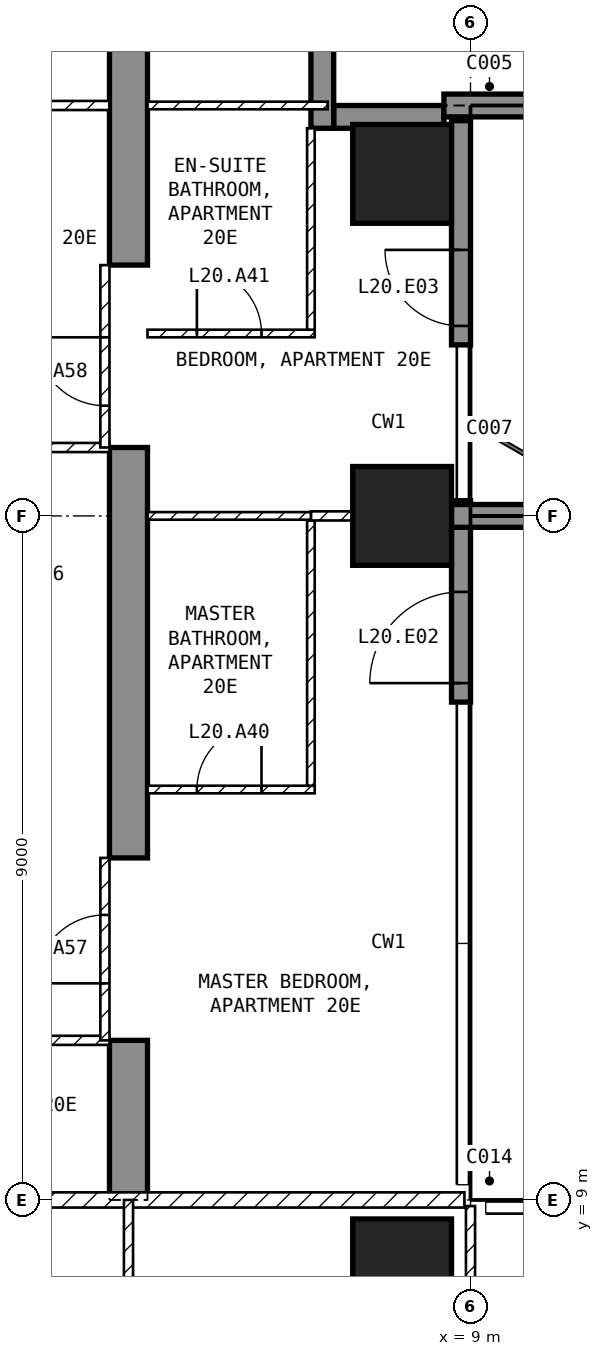
"""IFC4 building model, lengths in metres.
Left out: names, types, materials, properties, quantities, classifications, styles, units other than length and angle.
Written with IfcOpenShell. Run it as: python <this file> out.ifc"""

import sys

from ifc_helpers import new_model, si_unit, direction, frame, frame_2d, origin, origin_2d, place, context, subcontext, project, spatial, polyline, rectangle, outline, extrude, element, fill, save


model = new_model("IFC4")
c1 = context("Model", 3, precision=1e-05, world=origin(), true_north=direction((0.0, 1.0)))
c2 = subcontext(c1, "Body", "Model", "MODEL_VIEW")
j1 = project(units=[si_unit("LENGTHUNIT", "METRE"), si_unit("PLANEANGLEUNIT", "RADIAN")], contexts=[c1])
p1 = place(None, origin())
s1 = spatial("IfcSite", under=j1, at=p1, CompositionType="ELEMENT")
p2 = place(p1, origin())
s2 = spatial("IfcBuilding", under=s1, at=p2, CompositionType="ELEMENT")
p3 = place(p2, frame((0.0, 0.0, 89.0)))
s3 = spatial("IfcBuildingStorey", under=s2, at=p3, CompositionType="ELEMENT", Elevation=89.0)
for number, where, z_axis, x_axis in (
    (1, (8.1, 8.1, -0.25), (0.0, 0.0, 1.0), (1.0, 0.0, 0.0)),
    (2, (8.1, 18.0, -0.25), (0.0, 0.0, 1.0), (1.0, 0.0, 0.0)),
    (3, (8.1, 22.5, -0.25), (0.0, 0.0, 1.0), (1.0, 0.0, 0.0)),
):
    element("IfcColumn", number, at=place(p3, frame(where, z_axis=z_axis, x_axis=x_axis)), inside=s3, PredefinedType="COLUMN", context=c2, shape_type="SweptSolid", body=[
        extrude(rectangle(XDim=1.3, YDim=1.3, at=origin_2d()), origin(), (0.0, 0.0, 1.0), 3.45),
    ])
p4 = place(p3, frame((4.25, 9.0, -0.25), z_axis=(1.0, 0.0, 0.0), x_axis=(0.0, 1.0, 0.0)))
e4 = element("IfcWall", 4, at=p4, inside=s3, PredefinedType="SHEAR", context=c2, shape_type="SweptSolid", body=[
    extrude(outline(polyline([(0.0, 0.0), (2.1, 0.0), (2.1, 2.65), (4.5, 2.65), (4.5, 0.0), (9.9, 0.0), (9.9, 2.65), (12.3, 2.65), (12.3, 0.0), (16.45, 0.0), (16.45, 3.45), (0.0, 3.45), (0.0, 0.0)])), origin(), (0.0, 0.0, 1.0), 0.5),
])
p5 = place(p3, frame((8.875, 15.55, 0.0), z_axis=(0.0, 0.0, 1.0), x_axis=(0.0, 1.0, 0.0)))
e5 = element("IfcWall", 5, at=p5, inside=s3, PredefinedType="SOLIDWALL", context=c2, shape_type="SweptSolid", body=[
    extrude(rectangle(XDim=2.65, YDim=0.25, at=frame_2d((1.325, 0.0))), origin(), (0.0, 0.0, 1.0), 3.2),
])
p6 = place(p5, frame((0.25, 0.0, 0.0)))
e6 = element("IfcOpeningElement", 6, at=p6, cuts=e5, PredefinedType="OPENING", context=c2, shape_type="SweptSolid", body=[
    extrude(rectangle(XDim=1.2, YDim=2.4, at=frame_2d((0.6, 1.2))), frame((0.0, 0.135, 0.0), z_axis=(0.0, -1.0, 0.0), x_axis=(1.0, 0.0, 0.0)), (0.0, 0.0, 1.0), 0.27),
])
p7 = place(p3, frame((8.875, 20.25, 0.0), z_axis=(0.0, 0.0, 1.0), x_axis=(0.0, 1.0, 0.0)))
e7 = element("IfcWall", 7, at=p7, inside=s3, PredefinedType="SOLIDWALL", context=c2, shape_type="SweptSolid", body=[
    extrude(rectangle(XDim=2.95, YDim=0.25, at=frame_2d((1.475, 0.0))), origin(), (0.0, 0.0, 1.0), 3.2),
])
p8 = place(p7, frame((0.25, 0.0, 0.0)))
e8 = element("IfcOpeningElement", 8, at=p8, cuts=e7, PredefinedType="OPENING", context=c2, shape_type="SweptSolid", body=[
    extrude(rectangle(XDim=1.0, YDim=2.4, at=frame_2d((0.5, 1.2))), frame((0.0, 0.135, 0.0), z_axis=(0.0, -1.0, 0.0), x_axis=(1.0, 0.0, 0.0)), (0.0, 0.0, 1.0), 0.27),
])
p9 = place(p3, frame((8.65, 23.25, 0.0), z_axis=(0.0, 0.0, 1.0), x_axis=(-1.0, 0.0, 0.0)))
e9 = element("IfcWall", 9, at=p9, inside=s3, PredefinedType="SOLIDWALL", context=c2, shape_type="SweptSolid", body=[
    extrude(rectangle(XDim=1.45, YDim=0.3, at=frame_2d((0.725, 0.0))), origin(), (0.0, 0.0, 1.0), 3.2),
])
p10 = place(p3, frame((7.05, 23.1, 0.0), z_axis=(0.0, 0.0, 1.0), x_axis=(0.0, 1.0, 0.0)))
e10 = element("IfcWall", 10, at=p10, inside=s3, PredefinedType="SOLIDWALL", context=c2, shape_type="SweptSolid", body=[
    extrude(rectangle(XDim=1.8, YDim=0.3, at=frame_2d((0.9, 0.0))), origin(), (0.0, 0.0, 1.0), 3.2),
])
p11 = place(p3, frame((8.75, 18.0, 0.0), z_axis=(0.0, 0.0, 1.0), x_axis=(1.0, 0.0, 0.0)))
e11 = element("IfcWall", 11, at=p11, inside=s3, PredefinedType="SOLIDWALL", context=c2, shape_type="SweptSolid", body=[
    extrude(rectangle(XDim=2.95, YDim=0.3, at=frame_2d((1.475, 0.0))), origin(), (0.0, 0.0, 1.0), 3.2),
])
p12 = place(p3, frame((8.65, 23.4, 0.0), z_axis=(0.0, 0.0, 1.0), x_axis=(1.0, 0.0, 0.0)))
e12 = element("IfcWall", 12, at=p12, inside=s3, PredefinedType="SOLIDWALL", context=c2, shape_type="SweptSolid", body=[
    extrude(rectangle(XDim=3.05, YDim=0.3, at=frame_2d((1.525, 0.0))), origin(), (0.0, 0.0, 1.0), 3.2),
])
p13 = place(p3, frame((-8.92, 9.0, 0.0), z_axis=(0.0, 0.0, 1.0), x_axis=(1.0, 0.0, 0.0)))
e13 = element("IfcWall", 13, at=p13, inside=s3, PredefinedType="PARTITIONING", context=c2, shape_type="SweptSolid", body=[
    extrude(rectangle(XDim=17.84, YDim=0.2, at=frame_2d((8.92, 0.0))), origin(), (0.0, 0.0, 1.0), 3.2),
])
p14 = place(p13, frame((8.42, 0.0, 0.0)))
e14 = element("IfcOpeningElement", 14, at=p14, cuts=e13, PredefinedType="OPENING", context=c2, shape_type="SweptSolid", body=[
    extrude(rectangle(XDim=1.0, YDim=2.1, at=frame_2d((0.5, 1.05))), frame((0.0, 0.11, 0.0), z_axis=(0.0, -1.0, 0.0), x_axis=(1.0, 0.0, 0.0)), (0.0, 0.0, 1.0), 0.22),
])
p15 = place(p3, frame((9.0, 5.1, 0.0), z_axis=(0.0, 0.0, 1.0), x_axis=(0.0, 1.0, 0.0)))
e15 = element("IfcWall", 15, at=p15, inside=s3, PredefinedType="PARTITIONING", context=c2, shape_type="SweptSolid", body=[
    extrude(rectangle(XDim=3.82, YDim=0.12, at=frame_2d((1.91, 0.0))), origin(), (0.0, 0.0, 1.0), 3.2),
])
p16 = place(p15, frame((0.25, 0.0, 0.0)))
e16 = element("IfcOpeningElement", 16, at=p16, cuts=e15, PredefinedType="OPENING", context=c2, shape_type="SweptSolid", body=[
    extrude(rectangle(XDim=0.9, YDim=2.1, at=frame_2d((0.45, 1.05))), frame((0.0, 0.07, 0.0), z_axis=(0.0, -1.0, 0.0), x_axis=(1.0, 0.0, 0.0)), (0.0, 0.0, 1.0), 0.14),
])
p17 = place(p3, frame((4.5, 1.3, 0.0), z_axis=(0.0, 0.0, 1.0), x_axis=(0.0, 1.0, 0.0)))
e17 = element("IfcWall", 17, at=p17, inside=s3, PredefinedType="PARTITIONING", context=c2, shape_type="SweptSolid", body=[
    extrude(rectangle(XDim=7.7, YDim=0.12, at=frame_2d((3.85, 0.0))), origin(), (0.0, 0.0, 1.0), 3.2),
])
p18 = place(p17, frame((4.988, 0.0, 0.0)))
e18 = element("IfcOpeningElement", 18, at=p18, cuts=e17, PredefinedType="OPENING", context=c2, shape_type="SweptSolid", body=[
    extrude(rectangle(XDim=0.9, YDim=2.1, at=frame_2d((0.45, 1.05))), frame((0.0, 0.07, 0.0), z_axis=(0.0, -1.0, 0.0), x_axis=(1.0, 0.0, 0.0)), (0.0, 0.0, 1.0), 0.14),
])
p19 = place(p3, frame((-2.1, 11.1, 0.0), z_axis=(0.0, 0.0, 1.0), x_axis=(1.0, 0.0, 0.0)))
e19 = element("IfcWall", 19, at=p19, inside=s3, PredefinedType="PARTITIONING", context=c2, shape_type="SweptSolid", body=[
    extrude(rectangle(XDim=6.35, YDim=0.12, at=frame_2d((3.175, 0.0))), origin(), (0.0, 0.0, 1.0), 3.2),
])
p20 = place(p19, frame((2.725, 0.0, 0.0)))
e20 = element("IfcOpeningElement", 20, at=p20, cuts=e19, PredefinedType="OPENING", context=c2, shape_type="SweptSolid", body=[
    extrude(rectangle(XDim=0.9, YDim=2.1, at=frame_2d((0.45, 1.05))), frame((0.0, 0.07, 0.0), z_axis=(0.0, -1.0, 0.0), x_axis=(1.0, 0.0, 0.0)), (0.0, 0.0, 1.0), 0.14),
])
p21 = place(p3, frame((-4.25, 18.9, 0.0), z_axis=(0.0, 0.0, 1.0), x_axis=(1.0, 0.0, 0.0)))
e21 = element("IfcWall", 21, at=p21, inside=s3, PredefinedType="PARTITIONING", context=c2, shape_type="SweptSolid", body=[
    extrude(rectangle(XDim=8.5, YDim=0.12, at=frame_2d((4.25, 0.0))), origin(), (0.0, 0.0, 1.0), 3.2),
])
p22 = place(p21, frame((1.925, 0.0, 0.0)))
e22 = element("IfcOpeningElement", 22, at=p22, cuts=e21, PredefinedType="OPENING", context=c2, shape_type="SweptSolid", body=[
    extrude(rectangle(XDim=0.9, YDim=2.1, at=frame_2d((0.45, 1.05))), frame((0.0, 0.07, 0.0), z_axis=(0.0, -1.0, 0.0), x_axis=(1.0, 0.0, 0.0)), (0.0, 0.0, 1.0), 0.14),
])
p23 = place(p3, frame((-4.25, 23.4, 0.0), z_axis=(0.0, 0.0, 1.0), x_axis=(1.0, 0.0, 0.0)))
e23 = element("IfcWall", 23, at=p23, inside=s3, PredefinedType="PARTITIONING", context=c2, shape_type="SweptSolid", body=[
    extrude(rectangle(XDim=8.5, YDim=0.12, at=frame_2d((4.25, 0.0))), origin(), (0.0, 0.0, 1.0), 3.2),
])
p24 = place(p23, frame((1.925, 0.0, 0.0)))
e24 = element("IfcOpeningElement", 24, at=p24, cuts=e23, PredefinedType="OPENING", context=c2, shape_type="SweptSolid", body=[
    extrude(rectangle(XDim=0.9, YDim=2.1, at=frame_2d((0.45, 1.05))), frame((0.0, 0.07, 0.0), z_axis=(0.0, -1.0, 0.0), x_axis=(1.0, 0.0, 0.0)), (0.0, 0.0, 1.0), 0.14),
])
p25 = place(p3, frame((4.75, 14.4, 0.0), z_axis=(0.0, 0.0, 1.0), x_axis=(1.0, 0.0, 0.0)))
e25 = element("IfcWall", 25, at=p25, inside=s3, PredefinedType="PARTITIONING", context=c2, shape_type="SweptSolid", body=[
    extrude(rectangle(XDim=2.2, YDim=0.1, at=frame_2d((1.1, 0.0))), origin(), (0.0, 0.0, 1.0), 3.2),
])
p26 = place(p25, frame((0.65, 0.0, 0.0)))
e26 = element("IfcOpeningElement", 26, at=p26, cuts=e25, PredefinedType="OPENING", context=c2, shape_type="SweptSolid", body=[
    extrude(rectangle(XDim=0.85, YDim=2.1, at=frame_2d((0.425, 1.05))), frame((0.0, 0.06, 0.0), z_axis=(0.0, -1.0, 0.0), x_axis=(1.0, 0.0, 0.0)), (0.0, 0.0, 1.0), 0.12),
])
p27 = place(p3, frame((6.9, 14.45, 0.0), z_axis=(0.0, 0.0, 1.0), x_axis=(0.0, 1.0, 0.0)))
e27 = element("IfcWall", 27, at=p27, inside=s3, PredefinedType="PARTITIONING", context=c2, shape_type="SweptSolid", body=[
    extrude(rectangle(XDim=3.49, YDim=0.1, at=frame_2d((1.745, 0.0))), origin(), (0.0, 0.0, 1.0), 3.2),
])
p28 = place(p3, frame((6.9, 18.0, 0.0), z_axis=(0.0, 0.0, 1.0), x_axis=(1.0, 0.0, 0.0)))
e28 = element("IfcWall", 28, at=p28, inside=s3, PredefinedType="PARTITIONING", context=c2, shape_type="SweptSolid", body=[
    extrude(rectangle(XDim=0.55, YDim=0.12, at=frame_2d((0.275, 0.0))), origin(), (0.0, 0.0, 1.0), 2.296),
])
p29 = place(p3, frame((4.75, 18.0, 0.0), z_axis=(0.0, 0.0, 1.0), x_axis=(1.0, 0.0, 0.0)))
e29 = element("IfcWall", 29, at=p29, inside=s3, PredefinedType="PARTITIONING", context=c2, shape_type="SweptSolid", body=[
    extrude(rectangle(XDim=2.15, YDim=0.1, at=frame_2d((1.075, 0.0))), origin(), (0.0, 0.0, 1.0), 2.296),
])
p30 = place(p3, frame((4.75, 20.4, 0.0), z_axis=(0.0, 0.0, 1.0), x_axis=(1.0, 0.0, 0.0)))
e30 = element("IfcWall", 30, at=p30, inside=s3, PredefinedType="PARTITIONING", context=c2, shape_type="SweptSolid", body=[
    extrude(rectangle(XDim=2.2, YDim=0.1, at=frame_2d((1.1, 0.0))), origin(), (0.0, 0.0, 1.0), 3.2),
])
p31 = place(p30, frame((0.65, 0.0, 0.0)))
e31 = element("IfcOpeningElement", 31, at=p31, cuts=e30, PredefinedType="OPENING", context=c2, shape_type="SweptSolid", body=[
    extrude(rectangle(XDim=0.85, YDim=2.1, at=frame_2d((0.425, 1.05))), frame((0.0, 0.06, 0.0), z_axis=(0.0, -1.0, 0.0), x_axis=(1.0, 0.0, 0.0)), (0.0, 0.0, 1.0), 0.12),
])
p32 = place(p3, frame((6.9, 20.45, 0.0), z_axis=(0.0, 0.0, 1.0), x_axis=(0.0, 1.0, 0.0)))
e32 = element("IfcWall", 32, at=p32, inside=s3, PredefinedType="PARTITIONING", context=c2, shape_type="SweptSolid", body=[
    extrude(rectangle(XDim=2.65, YDim=0.1, at=frame_2d((1.325, 0.0))), origin(), (0.0, 0.0, 1.0), 3.2),
])
p33 = place(p3, frame((4.75, 23.4, 0.0), z_axis=(0.0, 0.0, 1.0), x_axis=(1.0, 0.0, 0.0)))
e33 = element("IfcWall", 33, at=p33, inside=s3, PredefinedType="PARTITIONING", context=c2, shape_type="SweptSolid", body=[
    extrude(rectangle(XDim=2.37, YDim=0.1, at=frame_2d((1.185, 0.0))), origin(), (0.0, 0.0, 1.0), 3.2),
])
p34 = place(p3, frame((4.19, 11.1, 0.0), z_axis=(0.0, 0.0, 1.0), x_axis=(0.0, 1.0, 0.0)))
e34 = element("IfcWall", 34, at=p34, inside=s3, PredefinedType="PARTITIONING", context=c2, shape_type="SweptSolid", body=[
    extrude(rectangle(XDim=2.4, YDim=0.12, at=frame_2d((1.2, 0.0))), origin(), (0.0, 0.0, 1.0), 2.4),
])
p35 = place(p34, frame((0.75, 0.0, 0.0)))
e35 = element("IfcOpeningElement", 35, at=p35, cuts=e34, PredefinedType="OPENING", context=c2, shape_type="SweptSolid", body=[
    extrude(rectangle(XDim=0.9, YDim=2.1, at=frame_2d((0.45, 1.05))), frame((0.0, 0.07, 0.0), z_axis=(0.0, -1.0, 0.0), x_axis=(1.0, 0.0, 0.0)), (0.0, 0.0, 1.0), 0.14),
])
p36 = place(p3, frame((4.19, 18.9, 0.0), z_axis=(0.0, 0.0, 1.0), x_axis=(0.0, 1.0, 0.0)))
e36 = element("IfcWall", 36, at=p36, inside=s3, PredefinedType="PARTITIONING", context=c2, shape_type="SweptSolid", body=[
    extrude(rectangle(XDim=2.4, YDim=0.12, at=frame_2d((1.2, 0.0))), origin(), (0.0, 0.0, 1.0), 2.4),
])
p37 = place(p36, frame((0.55, 0.0, 0.0)))
e37 = element("IfcOpeningElement", 37, at=p37, cuts=e36, PredefinedType="OPENING", context=c2, shape_type="SweptSolid", body=[
    extrude(rectangle(XDim=0.9, YDim=2.1, at=frame_2d((0.45, 1.05))), frame((0.0, 0.07, 0.0), z_axis=(0.0, -1.0, 0.0), x_axis=(1.0, 0.0, 0.0)), (0.0, 0.0, 1.0), 0.14),
])
p38 = place(p6, origin())
e38 = element("IfcDoor", 38, at=p38, inside=s3, OperationType="SINGLE_SWING_LEFT", PredefinedType="DOOR", context=c2, shape_type="SweptSolid", body=[
    extrude(rectangle(XDim=1.2, YDim=2.4, at=frame_2d((0.6, 1.2))), frame((0.0, 0.025, 0.0), z_axis=(0.0, -1.0, 0.0), x_axis=(1.0, 0.0, 0.0)), (0.0, 0.0, 1.0), 0.05),
])
fill(e6, e38)
p39 = place(p8, origin())
e39 = element("IfcDoor", 39, at=p39, inside=s3, OperationType="SINGLE_SWING_RIGHT", PredefinedType="DOOR", context=c2, shape_type="SweptSolid", body=[
    extrude(rectangle(XDim=1.0, YDim=2.4, at=frame_2d((0.5, 1.2))), frame((0.0, 0.025, 0.0), z_axis=(0.0, -1.0, 0.0), x_axis=(1.0, 0.0, 0.0)), (0.0, 0.0, 1.0), 0.05),
])
fill(e8, e39)
p40 = place(p26, origin())
e40 = element("IfcDoor", 40, at=p40, inside=s3, OperationType="SINGLE_SWING_RIGHT", PredefinedType="DOOR", context=c2, shape_type="SweptSolid", body=[
    extrude(rectangle(XDim=0.85, YDim=2.1, at=frame_2d((0.425, 1.05))), frame((0.0, 0.025, 0.0), z_axis=(0.0, -1.0, 0.0), x_axis=(1.0, 0.0, 0.0)), (0.0, 0.0, 1.0), 0.05),
])
fill(e26, e40)
p41 = place(p31, origin())
e41 = element("IfcDoor", 41, at=p41, inside=s3, OperationType="SINGLE_SWING_LEFT", PredefinedType="DOOR", context=c2, shape_type="SweptSolid", body=[
    extrude(rectangle(XDim=0.85, YDim=2.1, at=frame_2d((0.425, 1.05))), frame((0.0, 0.025, 0.0), z_axis=(0.0, -1.0, 0.0), x_axis=(1.0, 0.0, 0.0)), (0.0, 0.0, 1.0), 0.05),
])
fill(e31, e41)
p42 = place(p35, origin())
e42 = element("IfcDoor", 42, at=p42, inside=s3, OperationType="SINGLE_SWING_LEFT", PredefinedType="DOOR", context=c2, shape_type="SweptSolid", body=[
    extrude(rectangle(XDim=0.9, YDim=2.1, at=frame_2d((0.45, 1.05))), frame((0.0, 0.025, 0.0), z_axis=(0.0, -1.0, 0.0), x_axis=(1.0, 0.0, 0.0)), (0.0, 0.0, 1.0), 0.05),
])
fill(e35, e42)
p43 = place(p37, origin())
e43 = element("IfcDoor", 43, at=p43, inside=s3, OperationType="SINGLE_SWING_RIGHT", PredefinedType="DOOR", context=c2, shape_type="SweptSolid", body=[
    extrude(rectangle(XDim=0.9, YDim=2.1, at=frame_2d((0.45, 1.05))), frame((0.0, 0.025, 0.0), z_axis=(0.0, -1.0, 0.0), x_axis=(1.0, 0.0, 0.0)), (0.0, 0.0, 1.0), 0.05),
])
fill(e37, e43)
save(model, sys.argv[1])
